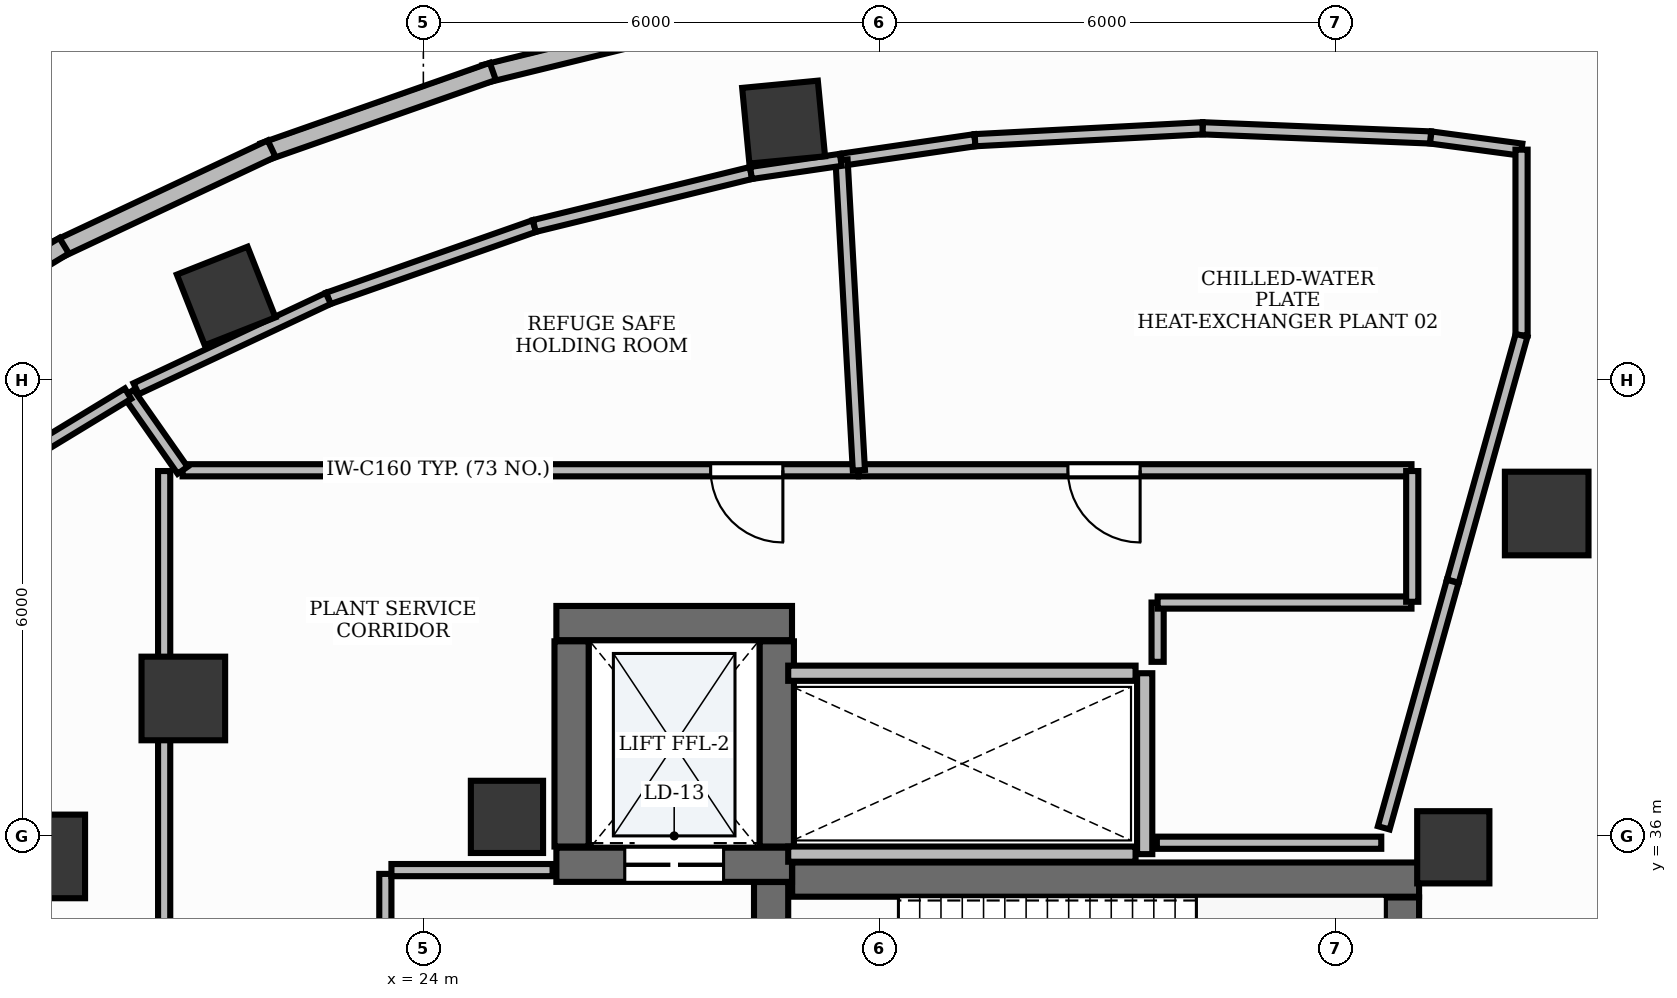
"""IFC4 building model, lengths in metres.
Left out: names, types, materials, properties, quantities, classifications, styles, units other than length and angle.
Written with IfcOpenShell. Run it as: python <this file> out.ifc"""

import sys

from ifc_helpers import new_model, si_unit, direction, frame, frame_2d, origin, origin_2d, place, context, subcontext, project, spatial, rectangle, extrude, element, fill, save


model = new_model("IFC4")
c1 = context("Model", 3, precision=1e-05, world=origin(), true_north=direction((0.0, 1.0)))
c2 = subcontext(c1, "Body", "Model", "MODEL_VIEW")
j1 = project(units=[si_unit("LENGTHUNIT", "METRE"), si_unit("PLANEANGLEUNIT", "RADIAN")], contexts=[c1])
p1 = place(None, origin())
s1 = spatial("IfcSite", under=j1, at=p1, CompositionType="ELEMENT")
p2 = place(p1, origin())
s2 = spatial("IfcBuilding", under=s1, at=p2, CompositionType="ELEMENT")
p3 = place(p2, frame((0.0, 0.0, 148.8)))
s3 = spatial("IfcBuildingStorey", under=s2, at=p3, CompositionType="ELEMENT", Elevation=148.8)
p4 = place(p3, frame((28.852, 35.425, 0.0), z_axis=(0.0, 0.0, 1.0), x_axis=(1.0, 0.0, 0.0)))
e1 = element("IfcWall", 1, at=p4, inside=s3, PredefinedType="SHEAR", context=c2, shape_type="SweptSolid", body=[
    extrude(rectangle(XDim=8.248, YDim=0.45, at=frame_2d((4.124, 0.0))), origin(), (0.0, 0.0, 1.0), 5.1),
])
p5 = place(p3, frame((36.875, 32.11, 0.0), z_axis=(0.0, 0.0, 1.0), x_axis=(0.0, 1.0, 0.0)))
e2 = element("IfcWall", 2, at=p5, inside=s3, PredefinedType="SHEAR", context=c2, shape_type="SweptSolid", body=[
    extrude(rectangle(XDim=3.08, YDim=0.45, at=frame_2d((1.54, 0.0))), origin(), (0.0, 0.0, 1.0), 5.1),
])
p6 = place(p3, frame((28.575, 32.11, 0.0), z_axis=(0.0, 0.0, 1.0), x_axis=(0.0, 1.0, 0.0)))
e3 = element("IfcWall", 3, at=p6, inside=s3, PredefinedType="SHEAR", context=c2, shape_type="SweptSolid", body=[
    extrude(rectangle(XDim=3.283, YDim=0.45, at=frame_2d((1.642, 0.0))), origin(), (0.0, 0.0, 1.0), 5.1),
])
p7 = place(p6, frame((0.2, 0.0, 0.0)))
e4 = element("IfcOpeningElement", 4, at=p7, cuts=e3, PredefinedType="OPENING", context=c2, shape_type="SweptSolid", body=[
    extrude(rectangle(XDim=1.05, YDim=2.15, at=frame_2d((0.525, 1.075))), frame((0.0, 0.24, 0.0), z_axis=(0.0, -1.0, 0.0), x_axis=(1.0, 0.0, 0.0)), (0.0, 0.0, 1.0), 0.48),
])
p8 = place(p3, frame((25.75, 38.8, 0.0), z_axis=(0.0, 0.0, 1.0), x_axis=(1.0, 0.0, 0.0)))
e5 = element("IfcWall", 5, at=p8, inside=s3, PredefinedType="SHEAR", context=c2, shape_type="SweptSolid", body=[
    extrude(rectangle(XDim=3.1, YDim=0.45, at=frame_2d((1.55, 0.0))), origin(), (0.0, 0.0, 1.0), 5.1),
])
p9 = place(p3, frame((25.75, 35.62, 0.0), z_axis=(0.0, 0.0, 1.0), x_axis=(1.0, 0.0, 0.0)))
e6 = element("IfcWall", 6, at=p9, inside=s3, PredefinedType="SHEAR", context=c2, shape_type="SweptSolid", body=[
    extrude(rectangle(XDim=3.1, YDim=0.45, at=frame_2d((1.55, 0.0))), origin(), (0.0, 0.0, 1.0), 5.1),
])
p10 = place(p9, frame((0.9, 0.0, 0.0)))
e7 = element("IfcOpeningElement", 7, at=p10, cuts=e6, PredefinedType="OPENING", context=c2, shape_type="SweptSolid", body=[
    extrude(rectangle(XDim=1.3, YDim=2.2, at=frame_2d((0.65, 1.1))), frame((0.0, 0.24, 0.0), z_axis=(0.0, -1.0, 0.0), x_axis=(1.0, 0.0, 0.0)), (0.0, 0.0, 1.0), 0.48),
])
for number, where, z_axis, x_axis in (
    (8, (25.95, 35.86, 0.0), (0.0, 0.0, 1.0), (0.0, 1.0, 0.0)),
    (9, (28.65, 35.86, 0.0), (0.0, 0.0, 1.0), (0.0, 1.0, 0.0)),
):
    element("IfcWall", number, at=place(p3, frame(where, z_axis=z_axis, x_axis=x_axis)), inside=s3, PredefinedType="SHEAR", context=c2, shape_type="SweptSolid", body=[
        extrude(rectangle(XDim=2.7, YDim=0.45, at=frame_2d((1.35, 0.0))), origin(), (0.0, 0.0, 1.0), 5.1),
    ])
for number, where, z_axis, x_axis in (
    (10, (37.55, 35.85, -0.0), (0.0, 0.0, 1.0), (1.0, 0.0, 0.0)),
    (11, (25.1, 36.25, -0.0), (0.0, 0.0, 1.0), (1.0, 0.0, 0.0)),
):
    element("IfcColumn", number, at=place(p3, frame(where, z_axis=z_axis, x_axis=x_axis)), inside=s3, PredefinedType="PILASTER", context=c2, shape_type="SweptSolid", body=[
        extrude(rectangle(XDim=0.95, YDim=0.95, at=origin_2d()), origin(), (0.0, 0.0, 1.0), 5.101),
    ])
p11 = place(p3, frame((38.779, 40.241, -0.0), z_axis=(0.0, 0.0, 1.0), x_axis=(1.0, 0.0, 0.0)))
e12 = element("IfcColumn", 12, at=p11, inside=s3, PredefinedType="COLUMN", context=c2, shape_type="SweptSolid", body=[
    extrude(rectangle(XDim=1.1, YDim=1.1, at=origin_2d()), origin(), (0.0, 0.0, 1.0), 5.101),
])
for number, where, z_axis, x_axis in (
    (13, (28.74, 45.39, -0.0), (0.0, 0.0, 1.0), (0.995, 0.095, 0.0)),
    (14, (21.406, 43.103, -0.0), (0.0, 0.0, 1.0), (0.93, 0.367, 0.0)),
):
    element("IfcColumn", number, at=place(p3, frame(where, z_axis=z_axis, x_axis=x_axis)), inside=s3, PredefinedType="COLUMN", context=c2, shape_type="SweptSolid", body=[
        extrude(rectangle(XDim=1.0, YDim=1.0, at=origin_2d()), origin(), (0.0, 0.0, 1.0), 5.101),
    ])
for number, where, z_axis, x_axis in (
    (15, (20.842, 37.808, -0.0), (0.0, 0.0, 1.0), (1.0, 0.0, 0.0)),
    (16, (19.0, 35.73, -0.0), (0.0, 0.0, 1.0), (1.0, 0.0, 0.0)),
):
    element("IfcColumn", number, at=place(p3, frame(where, z_axis=z_axis, x_axis=x_axis)), inside=s3, PredefinedType="COLUMN", context=c2, shape_type="SweptSolid", body=[
        extrude(rectangle(XDim=1.1, YDim=1.1, at=origin_2d()), origin(), (0.0, 0.0, 1.0), 5.101),
    ])
p12 = place(p3, frame((27.962, 46.798, 0.0), z_axis=(0.0, 0.0, 1.0), x_axis=(-0.971319985241, -0.237776126368, 0.0)))
e17 = element("IfcWall", 17, at=p12, inside=s3, PredefinedType="STANDARD", context=c2, shape_type="SweptSolid", body=[
    extrude(rectangle(XDim=3.249, YDim=0.24, at=frame_2d((1.625, 0.0))), origin(), (0.0, 0.0, 1.0), 5.1),
])
p13 = place(p3, frame((24.914, 46.057, 0.0), z_axis=(0.0, 0.0, 1.0), x_axis=(-0.943485978809, -0.331412443626, 0.0)))
e18 = element("IfcWall", 18, at=p13, inside=s3, PredefinedType="STANDARD", context=c2, shape_type="SweptSolid", body=[
    extrude(rectangle(XDim=3.194, YDim=0.24, at=frame_2d((1.597, 0.0))), origin(), (0.0, 0.0, 1.0), 4.67),
])
p14 = place(p3, frame((22.004, 45.042, 0.0), z_axis=(0.0, 0.0, 1.0), x_axis=(-0.905004459278, -0.425402078847, 0.0)))
e19 = element("IfcWall", 19, at=p14, inside=s3, PredefinedType="STANDARD", context=c2, shape_type="SweptSolid", body=[
    extrude(rectangle(XDim=3.126, YDim=0.24, at=frame_2d((1.563, 0.0))), origin(), (0.0, 0.0, 1.0), 5.1),
])
p15 = place(p3, frame((19.274, 43.765, 0.0), z_axis=(0.0, 0.0, 1.0), x_axis=(-0.854572854074, -0.519331529063, 0.0)))
e20 = element("IfcWall", 20, at=p15, inside=s3, PredefinedType="STANDARD", context=c2, shape_type="SweptSolid", body=[
    extrude(rectangle(XDim=3.046, YDim=0.24, at=frame_2d((1.523, 0.0))), origin(), (0.0, 0.0, 1.0), 5.1),
])
p16 = place(p3, frame((33.49, 35.76, 0.0), z_axis=(0.0, 0.0, 1.0), x_axis=(0.0, 1.0, 0.0)))
e21 = element("IfcWall", 21, at=p16, inside=s3, PredefinedType="PARTITIONING", context=c2, shape_type="SweptSolid", body=[
    extrude(rectangle(XDim=2.38, YDim=0.2, at=frame_2d((1.19, 0.0))), origin(), (0.0, 0.0, 1.0), 3.96),
])
for number, where, z_axis, x_axis in (
    (22, (28.8, 35.76, 0.0), (0.0, 0.0, 1.0), (1.0, 0.0, 0.0)),
    (23, (28.8, 38.14, 0.0), (0.0, 0.0, 1.0), (1.0, 0.0, 0.0)),
):
    element("IfcWall", number, at=place(p3, frame(where, z_axis=z_axis, x_axis=x_axis)), inside=s3, PredefinedType="PARTITIONING", context=c2, shape_type="SweptSolid", body=[
        extrude(rectangle(XDim=4.57, YDim=0.2, at=frame_2d((2.285, 0.0))), origin(), (0.0, 0.0, 1.0), 3.96),
    ])
p17 = place(p3, frame((23.5, 32.1, 0.0), z_axis=(0.0, 0.0, 1.0), x_axis=(0.0, 1.0, 0.0)))
e24 = element("IfcWall", 24, at=p17, inside=s3, PredefinedType="PARTITIONING", context=c2, shape_type="SweptSolid", body=[
    extrude(rectangle(XDim=3.4, YDim=0.16, at=frame_2d((1.7, 0.0))), origin(), (0.0, 0.0, 1.0), 3.96),
])
p18 = place(p17, frame((1.175, 0.0, 0.0)))
e25 = element("IfcOpeningElement", 25, at=p18, cuts=e24, PredefinedType="OPENING", context=c2, shape_type="SweptSolid", body=[
    extrude(rectangle(XDim=1.05, YDim=2.15, at=frame_2d((0.525, 1.075))), frame((0.0, 0.095, 0.0), z_axis=(0.0, -1.0, 0.0), x_axis=(1.0, 0.0, 0.0)), (0.0, 0.0, 1.0), 0.19),
])
p19 = place(p3, frame((23.58, 35.55, 0.0), z_axis=(0.0, 0.0, 1.0), x_axis=(1.0, 0.0, 0.0)))
e26 = element("IfcWall", 26, at=p19, inside=s3, PredefinedType="PARTITIONING", context=c2, shape_type="SweptSolid", body=[
    extrude(rectangle(XDim=2.12, YDim=0.16, at=frame_2d((1.06, 0.0))), origin(), (0.0, 0.0, 1.0), 3.96),
])
p20 = place(p3, frame((37.0, 40.81, 0.0), z_axis=(0.0, 0.0, 1.0), x_axis=(-1.0, 0.0, 0.0)))
e27 = element("IfcWall", 27, at=p20, inside=s3, PredefinedType="PARTITIONING", context=c2, shape_type="SweptSolid", body=[
    extrude(rectangle(XDim=7.27, YDim=0.16, at=frame_2d((3.635, 0.0))), origin(), (0.0, 0.0, 1.0), 3.96),
])
p21 = place(p20, frame((3.57, 0.0, 0.0)))
e28 = element("IfcOpeningElement", 28, at=p21, cuts=e27, PredefinedType="OPENING", context=c2, shape_type="SweptSolid", body=[
    extrude(rectangle(XDim=0.95, YDim=2.15, at=frame_2d((0.475, 1.075))), frame((0.0, 0.095, 0.0), z_axis=(0.0, -1.0, 0.0), x_axis=(1.0, 0.0, 0.0)), (0.0, 0.0, 1.0), 0.19),
])
p22 = place(p3, frame((29.72, 40.81, 0.0), z_axis=(0.0, 0.0, 1.0), x_axis=(-1.0, 0.0, 0.0)))
e29 = element("IfcWall", 29, at=p22, inside=s3, PredefinedType="PARTITIONING", context=c2, shape_type="SweptSolid", body=[
    extrude(rectangle(XDim=8.887, YDim=0.16, at=frame_2d((4.444, 0.0))), origin(), (0.0, 0.0, 1.0), 3.96),
])
p23 = place(p22, frame((0.99, 0.0, 0.0)))
e30 = element("IfcOpeningElement", 30, at=p23, cuts=e29, PredefinedType="OPENING", context=c2, shape_type="SweptSolid", body=[
    extrude(rectangle(XDim=0.95, YDim=2.15, at=frame_2d((0.475, 1.075))), frame((0.0, 0.095, 0.0), z_axis=(0.0, -1.0, 0.0), x_axis=(1.0, 0.0, 0.0)), (0.0, 0.0, 1.0), 0.19),
])
p24 = place(p3, frame((20.59, 40.8, 0.0), z_axis=(0.0, 0.0, 1.0), x_axis=(0.0, -1.0, 0.0)))
e31 = element("IfcWall", 31, at=p24, inside=s3, PredefinedType="PARTITIONING", context=c2, shape_type="SweptSolid", body=[
    extrude(rectangle(XDim=8.24, YDim=0.16, at=frame_2d((4.12, 0.0))), origin(), (0.0, 0.0, 1.0), 3.96),
])
p25 = place(p24, frame((6.537, 0.0, 0.0)))
e32 = element("IfcOpeningElement", 32, at=p25, cuts=e31, PredefinedType="OPENING", context=c2, shape_type="SweptSolid", body=[
    extrude(rectangle(XDim=0.95, YDim=2.15, at=frame_2d((0.475, 1.075))), frame((0.0, 0.095, 0.0), z_axis=(0.0, -1.0, 0.0), x_axis=(1.0, 0.0, 0.0)), (0.0, 0.0, 1.0), 0.19),
])
p26 = place(p3, frame((29.502, 44.896, 0.0), z_axis=(0.0, 0.0, 1.0), x_axis=(0.989448077953, 0.144887891265, 0.0)))
e33 = element("IfcWall", 33, at=p26, inside=s3, PredefinedType="PARTITIONING", context=c2, shape_type="SweptSolid", body=[
    extrude(rectangle(XDim=1.774, YDim=0.16, at=frame_2d((0.887, 0.0))), origin(), (0.0, 0.0, 1.0), 3.96),
])
p27 = place(p3, frame((31.258, 45.153, 0.0), z_axis=(0.0, 0.0, 1.0), x_axis=(0.998638877547, 0.052157379655, 0.0)))
e34 = element("IfcWall", 34, at=p27, inside=s3, PredefinedType="PARTITIONING", context=c2, shape_type="SweptSolid", body=[
    extrude(rectangle(XDim=3.0, YDim=0.16, at=frame_2d((1.5, 0.0))), origin(), (0.0, 0.0, 1.0), 3.96),
])
p28 = place(p3, frame((34.254, 45.309, 0.0), z_axis=(0.0, 0.0, 1.0), x_axis=(0.999189222559, -0.040260371605, 0.0)))
e35 = element("IfcWall", 35, at=p28, inside=s3, PredefinedType="PARTITIONING", context=c2, shape_type="SweptSolid", body=[
    extrude(rectangle(XDim=3.002, YDim=0.16, at=frame_2d((1.501, 0.0))), origin(), (0.0, 0.0, 1.0), 3.96),
])
p29 = place(p3, frame((37.254, 45.188, 0.0), z_axis=(0.0, 0.0, 1.0), x_axis=(0.991155201979, -0.132707820379, 0.0)))
e36 = element("IfcWall", 36, at=p29, inside=s3, PredefinedType="PARTITIONING", context=c2, shape_type="SweptSolid", body=[
    extrude(rectangle(XDim=1.205, YDim=0.16, at=frame_2d((0.603, 0.0))), origin(), (0.0, 0.0, 1.0), 3.96),
])
p30 = place(p3, frame((38.448, 45.028, 0.0), z_axis=(0.0, 0.0, 1.0), x_axis=(0.0, -1.0, 0.0)))
e37 = element("IfcWall", 37, at=p30, inside=s3, PredefinedType="PARTITIONING", context=c2, shape_type="SweptSolid", body=[
    extrude(rectangle(XDim=2.443, YDim=0.16, at=frame_2d((1.222, 0.0))), origin(), (0.0, 0.0, 1.0), 3.96),
])
p31 = place(p3, frame((38.448, 42.584, 0.0), z_axis=(0.0, 0.0, 1.0), x_axis=(-0.269481539503, -0.963005555471, 0.0)))
e38 = element("IfcWall", 38, at=p31, inside=s3, PredefinedType="PARTITIONING", context=c2, shape_type="SweptSolid", body=[
    extrude(rectangle(XDim=3.357, YDim=0.16, at=frame_2d((1.678, 0.0))), origin(), (0.0, 0.0, 1.0), 3.96),
])
p32 = place(p3, frame((37.542, 39.348, 0.0), z_axis=(0.0, 0.0, 1.0), x_axis=(-0.269438917313, -0.963017481584, 0.0)))
e39 = element("IfcWall", 39, at=p32, inside=s3, PredefinedType="PARTITIONING", context=c2, shape_type="SweptSolid", body=[
    extrude(rectangle(XDim=3.366, YDim=0.16, at=frame_2d((1.683, 0.0))), origin(), (0.0, 0.0, 1.0), 3.96),
])
p33 = place(p3, frame((36.602, 35.91, 0.0), z_axis=(0.0, 0.0, 1.0), x_axis=(-1.0, 0.0, 0.0)))
e40 = element("IfcWall", 40, at=p33, inside=s3, PredefinedType="PARTITIONING", context=c2, shape_type="SweptSolid", body=[
    extrude(rectangle(XDim=2.952, YDim=0.16, at=frame_2d((1.476, 0.0))), origin(), (0.0, 0.0, 1.0), 3.96),
])
p34 = place(p3, frame((33.66, 38.29, 0.0), z_axis=(0.0, 0.0, 1.0), x_axis=(0.0, 1.0, 0.0)))
e41 = element("IfcWall", 41, at=p34, inside=s3, PredefinedType="PARTITIONING", context=c2, shape_type="SweptSolid", body=[
    extrude(rectangle(XDim=0.78, YDim=0.16, at=frame_2d((0.39, 0.0))), origin(), (0.0, 0.0, 1.0), 3.96),
])
p35 = place(p3, frame((33.66, 39.07, 0.0), z_axis=(0.0, 0.0, 1.0), x_axis=(1.0, 0.0, 0.0)))
e42 = element("IfcWall", 42, at=p35, inside=s3, PredefinedType="PARTITIONING", context=c2, shape_type="SweptSolid", body=[
    extrude(rectangle(XDim=3.34, YDim=0.16, at=frame_2d((1.67, 0.0))), origin(), (0.0, 0.0, 1.0), 3.96),
])
p36 = place(p3, frame((37.01, 39.08, 0.0), z_axis=(0.0, 0.0, 1.0), x_axis=(0.0, 1.0, 0.0)))
e43 = element("IfcWall", 43, at=p36, inside=s3, PredefinedType="PARTITIONING", context=c2, shape_type="SweptSolid", body=[
    extrude(rectangle(XDim=1.72, YDim=0.16, at=frame_2d((0.86, 0.0))), origin(), (0.0, 0.0, 1.0), 3.96),
])
p37 = place(p3, frame((29.73, 40.81, 0.0), z_axis=(0.0, 0.0, 1.0), x_axis=(-0.055846733283, 0.998439353382, 0.0)))
e44 = element("IfcWall", 44, at=p37, inside=s3, PredefinedType="PARTITIONING", context=c2, shape_type="SweptSolid", body=[
    extrude(rectangle(XDim=4.092, YDim=0.16, at=frame_2d((2.046, 0.0))), origin(), (0.0, 0.0, 1.0), 3.96),
])
p38 = place(p3, frame((22.75, 43.072, 0.0), z_axis=(0.0, 0.0, 1.0), x_axis=(0.943514716337, 0.331330620463, 0.0)))
e45 = element("IfcWall", 45, at=p38, inside=s3, PredefinedType="PARTITIONING", context=c2, shape_type="SweptSolid", body=[
    extrude(rectangle(XDim=2.873, YDim=0.16, at=frame_2d((1.437, 0.0))), origin(), (0.0, 0.0, 1.0), 3.96),
])
p39 = place(p3, frame((25.46, 44.023, 0.0), z_axis=(0.0, 0.0, 1.0), x_axis=(0.971324762717, 0.237756609442, 0.0)))
e46 = element("IfcWall", 46, at=p39, inside=s3, PredefinedType="PARTITIONING", context=c2, shape_type="SweptSolid", body=[
    extrude(rectangle(XDim=2.935, YDim=0.16, at=frame_2d((1.467, 0.0))), origin(), (0.0, 0.0, 1.0), 3.96),
])
p40 = place(p3, frame((28.311, 44.721, 0.0), z_axis=(0.0, 0.0, 1.0), x_axis=(0.989456774731, 0.144828488011, 0.0)))
e47 = element("IfcWall", 47, at=p40, inside=s3, PredefinedType="PARTITIONING", context=c2, shape_type="SweptSolid", body=[
    extrude(rectangle(XDim=1.194, YDim=0.16, at=frame_2d((0.597, 0.0))), origin(), (0.0, 0.0, 1.0), 3.96),
])
p41 = place(p3, frame((20.833, 40.81, 0.0), z_axis=(0.0, 0.0, 1.0), x_axis=(-0.57363449767, 0.819111386249, 0.0)))
e48 = element("IfcWall", 48, at=p41, inside=s3, PredefinedType="PARTITIONING", context=c2, shape_type="SweptSolid", body=[
    extrude(rectangle(XDim=1.237, YDim=0.16, at=frame_2d((0.619, 0.0))), origin(), (0.0, 0.0, 1.0), 3.96),
])
p42 = place(p3, frame((20.221, 41.883, 0.0), z_axis=(0.0, 0.0, 1.0), x_axis=(0.90499881039, 0.425414096137, 0.0)))
e49 = element("IfcWall", 49, at=p42, inside=s3, PredefinedType="PARTITIONING", context=c2, shape_type="SweptSolid", body=[
    extrude(rectangle(XDim=2.794, YDim=0.16, at=frame_2d((1.397, 0.0))), origin(), (0.0, 0.0, 1.0), 3.96),
])
p43 = place(p3, frame((17.912, 40.479, 0.0), z_axis=(0.0, 0.0, 1.0), x_axis=(0.854545843444, 0.519375973118, 0.0)))
e50 = element("IfcWall", 50, at=p43, inside=s3, PredefinedType="PARTITIONING", context=c2, shape_type="SweptSolid", body=[
    extrude(rectangle(XDim=2.578, YDim=0.16, at=frame_2d((1.289, 0.0))), origin(), (0.0, 0.0, 1.0), 3.96),
])
p44 = place(p10, origin())
e51 = element("IfcDoor", 51, at=p44, inside=s3, OperationType="DOUBLE_DOOR_SLIDING", PredefinedType="DOOR", context=c2, shape_type="SweptSolid", body=[
    extrude(rectangle(XDim=1.3, YDim=2.2, at=frame_2d((0.65, 1.1))), frame((0.0, 0.025, 0.0), z_axis=(0.0, -1.0, 0.0), x_axis=(1.0, 0.0, 0.0)), (0.0, 0.0, 1.0), 0.05),
])
fill(e7, e51)
p45 = place(p21, origin())
e52 = element("IfcDoor", 52, at=p45, inside=s3, OperationType="SINGLE_SWING_LEFT", PredefinedType="DOOR", context=c2, shape_type="SweptSolid", body=[
    extrude(rectangle(XDim=0.95, YDim=2.15, at=frame_2d((0.475, 1.075))), frame((0.0, 0.025, 0.0), z_axis=(0.0, -1.0, 0.0), x_axis=(1.0, 0.0, 0.0)), (0.0, 0.0, 1.0), 0.05),
])
fill(e28, e52)
p46 = place(p23, origin())
e53 = element("IfcDoor", 53, at=p46, inside=s3, OperationType="SINGLE_SWING_LEFT", PredefinedType="DOOR", context=c2, shape_type="SweptSolid", body=[
    extrude(rectangle(XDim=0.95, YDim=2.15, at=frame_2d((0.475, 1.075))), frame((0.0, 0.025, 0.0), z_axis=(0.0, -1.0, 0.0), x_axis=(1.0, 0.0, 0.0)), (0.0, 0.0, 1.0), 0.05),
])
fill(e30, e53)
save(model, sys.argv[1])
